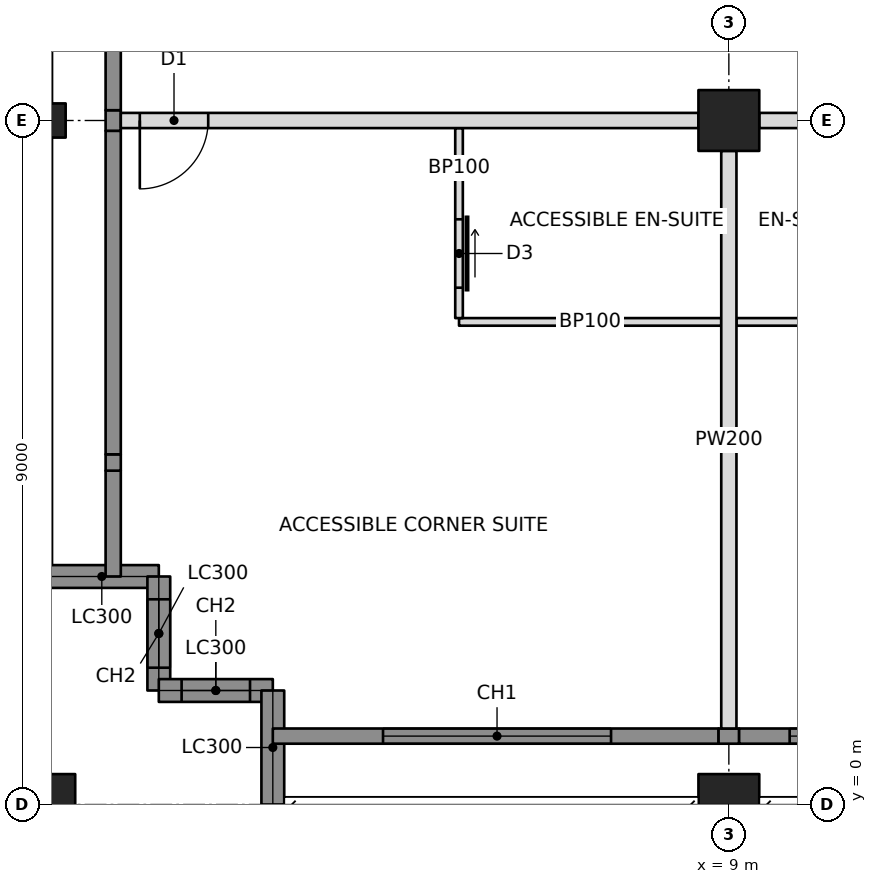
"""IFC4 building model, lengths in metres.
Left out: names, types, materials, properties, quantities, classifications, styles, units other than length and angle.
Written with IfcOpenShell. Run it as: python <this file> out.ifc"""

import sys

from ifc_helpers import new_model, si_unit, direction, frame, frame_2d, origin, origin_with_axes, origin_2d, place, context, subcontext, project, spatial, rectangle, hollow_rectangle, i_section, extrude, element, fill, save


model = new_model("IFC4")
c1 = context("Model", 3, precision=1e-05, world=origin(), true_north=direction((0.0, 1.0)))
c2 = subcontext(c1, "Body", "Model", "MODEL_VIEW")
j1 = project(units=[si_unit("LENGTHUNIT", "METRE"), si_unit("PLANEANGLEUNIT", "RADIAN")], contexts=[c1])
p1 = place(None, origin())
s1 = spatial("IfcSite", under=j1, at=p1, CompositionType="ELEMENT")
p2 = place(p1, origin())
s2 = spatial("IfcBuilding", under=s1, at=p2, CompositionType="ELEMENT")
p3 = place(p2, frame((0.0, 0.0, 187.6)))
s3 = spatial("IfcBuildingStorey", under=s2, at=p3, CompositionType="ELEMENT", Elevation=187.6)
p4 = place(p3, origin_with_axes())
e1 = element("IfcColumn", 1, at=p4, inside=s3, PredefinedType="COLUMN", context=c2, shape_type="SweptSolid", body=[
    extrude(hollow_rectangle(XDim=0.8, YDim=0.8, WallThickness=0.07, at=origin_2d()), origin(), (0.0, 0.0, 1.0), 3.4),
])
p5 = place(p3, frame((0.0, 9.0, 0.0), z_axis=(0.0, 0.0, 1.0), x_axis=(0.0, 1.0, 0.0)))
e2 = element("IfcColumn", 2, at=p5, inside=s3, PredefinedType="COLUMN", context=c2, shape_type="SweptSolid", body=[
    extrude(i_section(OverallWidth=0.449, OverallDepth=0.549, WebThickness=0.072, FlangeThickness=0.115, at=origin_2d()), origin(), (0.0, 0.0, 1.0), 3.4),
])
p6 = place(p3, frame((9.0, 0.0, 0.0), z_axis=(0.0, 0.0, 1.0), x_axis=(1.0, 0.0, 0.0)))
e3 = element("IfcColumn", 3, at=p6, inside=s3, PredefinedType="COLUMN", context=c2, shape_type="SweptSolid", body=[
    extrude(hollow_rectangle(XDim=0.8, YDim=0.8, WallThickness=0.07, at=origin_2d()), origin(), (0.0, 0.0, 1.0), 3.4),
])
p7 = place(p3, frame((9.0, 9.0, 0.0), z_axis=(0.0, 0.0, 1.0), x_axis=(1.0, 0.0, 0.0)))
e4 = element("IfcColumn", 4, at=p7, inside=s3, PredefinedType="COLUMN", context=c2, shape_type="SweptSolid", body=[
    extrude(hollow_rectangle(XDim=0.8, YDim=0.8, WallThickness=0.06, at=origin_2d()), origin(), (0.0, 0.0, 1.0), 3.4),
])
p8 = place(p3, frame((0.0, 3.0, 0.0), z_axis=(0.0, 0.0, 1.0), x_axis=(1.0, 0.0, 0.0)))
e5 = element("IfcWall", 5, at=p8, inside=s3, PredefinedType="SOLIDWALL", context=c2, shape_type="SweptSolid", body=[
    extrude(rectangle(XDim=1.5, YDim=0.3, at=frame_2d((0.75, 0.0))), origin(), (0.0, 0.0, 1.0), 2.42),
])
p9 = place(p3, frame((1.5, 3.0, 0.0), z_axis=(0.0, 0.0, 1.0), x_axis=(0.0, -1.0, 0.0)))
e6 = element("IfcWall", 6, at=p9, inside=s3, PredefinedType="SOLIDWALL", context=c2, shape_type="SweptSolid", body=[
    extrude(rectangle(XDim=1.5, YDim=0.3, at=frame_2d((0.75, 0.0))), origin(), (0.0, 0.0, 1.0), 3.2),
])
p10 = place(p9, frame((0.3, 0.0, 0.6)))
e7 = element("IfcOpeningElement", 7, at=p10, cuts=e6, PredefinedType="OPENING", context=c2, shape_type="SweptSolid", body=[
    extrude(rectangle(XDim=0.9, YDim=2.2, at=frame_2d((0.45, 1.1))), frame((0.0, 0.16, 0.0), z_axis=(0.0, -1.0, 0.0), x_axis=(1.0, 0.0, 0.0)), (0.0, 0.0, 1.0), 0.32),
])
p11 = place(p3, frame((1.5, 1.5, 0.0), z_axis=(0.0, 0.0, 1.0), x_axis=(1.0, 0.0, 0.0)))
e8 = element("IfcWall", 8, at=p11, inside=s3, PredefinedType="SOLIDWALL", context=c2, shape_type="SweptSolid", body=[
    extrude(rectangle(XDim=1.5, YDim=0.3, at=frame_2d((0.75, 0.0))), origin(), (0.0, 0.0, 1.0), 3.2),
])
p12 = place(p11, frame((0.3, 0.0, 0.6)))
e9 = element("IfcOpeningElement", 9, at=p12, cuts=e8, PredefinedType="OPENING", context=c2, shape_type="SweptSolid", body=[
    extrude(rectangle(XDim=0.9, YDim=2.2, at=frame_2d((0.45, 1.1))), frame((0.0, 0.16, 0.0), z_axis=(0.0, -1.0, 0.0), x_axis=(1.0, 0.0, 0.0)), (0.0, 0.0, 1.0), 0.32),
])
p13 = place(p3, frame((3.0, 1.5, 0.0), z_axis=(0.0, 0.0, 1.0), x_axis=(0.0, -1.0, 0.0)))
e10 = element("IfcWall", 10, at=p13, inside=s3, PredefinedType="SOLIDWALL", context=c2, shape_type="SweptSolid", body=[
    extrude(rectangle(XDim=1.5, YDim=0.3, at=frame_2d((0.75, 0.0))), origin(), (0.0, 0.0, 1.0), 2.42),
])
p14 = place(p3, frame((3.0, 0.9, 0.0), z_axis=(0.0, 0.0, 1.0), x_axis=(1.0, 0.0, 0.0)))
e11 = element("IfcWall", 11, at=p14, inside=s3, PredefinedType="SOLIDWALL", context=c2, shape_type="SweptSolid", body=[
    extrude(rectangle(XDim=5.865, YDim=0.2, at=frame_2d((2.932, 0.0))), origin(), (0.0, 0.0, 1.0), 3.2),
])
p15 = place(p14, frame((1.45, 0.0, 0.6)))
e12 = element("IfcOpeningElement", 12, at=p15, cuts=e11, PredefinedType="OPENING", context=c2, shape_type="SweptSolid", body=[
    extrude(rectangle(XDim=3.0, YDim=2.2, at=frame_2d((1.5, 1.1))), frame((0.0, 0.11, 0.0), z_axis=(0.0, -1.0, 0.0), x_axis=(1.0, 0.0, 0.0)), (0.0, 0.0, 1.0), 0.22),
])
p16 = place(p3, frame((0.9, 3.0, 0.0), z_axis=(0.0, 0.0, 1.0), x_axis=(0.0, 1.0, 0.0)))
e13 = element("IfcWall", 13, at=p16, inside=s3, PredefinedType="SOLIDWALL", context=c2, shape_type="SweptSolid", body=[
    extrude(rectangle(XDim=1.393, YDim=0.2, at=frame_2d((0.696, 0.0))), origin(), (0.0, 0.0, 1.0), 3.2),
])
p17 = place(p3, frame((1.0, 9.0, 0.0), z_axis=(0.0, 0.0, 1.0), x_axis=(1.0, 0.0, 0.0)))
e14 = element("IfcWall", 14, at=p17, inside=s3, PredefinedType="PARTITIONING", context=c2, shape_type="SweptSolid", body=[
    extrude(rectangle(XDim=7.6, YDim=0.2, at=frame_2d((3.8, 0.0))), origin(), (0.0, 0.0, 1.0), 2.438),
])
p18 = place(p17, frame((0.25, 0.0, 0.0)))
e15 = element("IfcOpeningElement", 15, at=p18, cuts=e14, PredefinedType="OPENING", context=c2, shape_type="SweptSolid", body=[
    extrude(rectangle(XDim=0.9, YDim=2.1, at=frame_2d((0.45, 1.05))), frame((0.0, 0.11, 0.0), z_axis=(0.0, -1.0, 0.0), x_axis=(1.0, 0.0, 0.0)), (0.0, 0.0, 1.0), 0.22),
])
p19 = place(p3, frame((9.4, 9.0, 0.0), z_axis=(0.0, 0.0, 1.0), x_axis=(1.0, 0.0, 0.0)))
e16 = element("IfcWall", 16, at=p19, inside=s3, PredefinedType="PARTITIONING", context=c2, shape_type="SweptSolid", body=[
    extrude(rectangle(XDim=8.2, YDim=0.2, at=frame_2d((4.1, 0.0))), origin(), (0.0, 0.0, 1.0), 2.405),
])
p20 = place(p19, frame((2.95, 0.0, 0.0)))
e17 = element("IfcOpeningElement", 17, at=p20, cuts=e16, PredefinedType="OPENING", context=c2, shape_type="SweptSolid", body=[
    extrude(rectangle(XDim=0.9, YDim=2.1, at=frame_2d((0.45, 1.05))), frame((0.0, 0.11, 0.0), z_axis=(0.0, -1.0, 0.0), x_axis=(1.0, 0.0, 0.0)), (0.0, 0.0, 1.0), 0.22),
])
p21 = place(p19, frame((4.35, 0.0, 0.0)))
e18 = element("IfcOpeningElement", 18, at=p21, cuts=e16, PredefinedType="OPENING", context=c2, shape_type="SweptSolid", body=[
    extrude(rectangle(XDim=0.9, YDim=2.1, at=frame_2d((0.45, 1.05))), frame((0.0, 0.11, 0.0), z_axis=(0.0, -1.0, 0.0), x_axis=(1.0, 0.0, 0.0)), (0.0, 0.0, 1.0), 0.22),
])
p22 = place(p3, frame((9.0, 8.6, 0.0), z_axis=(0.0, 0.0, 1.0), x_axis=(0.0, -1.0, 0.0)))
e19 = element("IfcWall", 19, at=p22, inside=s3, PredefinedType="PARTITIONING", context=c2, shape_type="SweptSolid", body=[
    extrude(rectangle(XDim=7.6, YDim=0.2, at=frame_2d((3.8, 0.0))), origin(), (0.0, 0.0, 1.0), 2.438),
])
p23 = place(p3, frame((5.45, 6.35, 0.0), z_axis=(0.0, 0.0, 1.0), x_axis=(1.0, 0.0, 0.0)))
e20 = element("IfcWall", 20, at=p23, inside=s3, PredefinedType="PARTITIONING", context=c2, shape_type="SweptSolid", body=[
    extrude(rectangle(XDim=3.45, YDim=0.1, at=frame_2d((1.725, 0.0))), origin(), (0.0, 0.0, 1.0), 2.438),
])
p24 = place(p3, frame((5.45, 8.9, 0.0), z_axis=(0.0, 0.0, 1.0), x_axis=(0.0, -1.0, 0.0)))
e21 = element("IfcWall", 21, at=p24, inside=s3, PredefinedType="PARTITIONING", context=c2, shape_type="SweptSolid", body=[
    extrude(rectangle(XDim=2.5, YDim=0.1, at=frame_2d((1.25, 0.0))), origin(), (0.0, 0.0, 1.0), 2.438),
])
p25 = place(p24, frame((1.2, 0.0, 0.0)))
e22 = element("IfcOpeningElement", 22, at=p25, cuts=e21, PredefinedType="OPENING", context=c2, shape_type="SweptSolid", body=[
    extrude(rectangle(XDim=0.9, YDim=2.1, at=frame_2d((0.45, 1.05))), frame((0.0, 0.06, 0.0), z_axis=(0.0, -1.0, 0.0), x_axis=(1.0, 0.0, 0.0)), (0.0, 0.0, 1.0), 0.12),
])
p26 = place(p3, frame((9.1, 6.35, 0.0), z_axis=(0.0, 0.0, 1.0), x_axis=(1.0, 0.0, 0.0)))
e23 = element("IfcWall", 23, at=p26, inside=s3, PredefinedType="PARTITIONING", context=c2, shape_type="SweptSolid", body=[
    extrude(rectangle(XDim=2.95, YDim=0.1, at=frame_2d((1.475, 0.0))), origin(), (0.0, 0.0, 1.0), 2.438),
])
p27 = place(p3, frame((8.865, 0.9, 0.0), z_axis=(0.0, 0.0, 1.0), x_axis=(1.0, 0.0, 0.0)))
e24 = element("IfcWall", 24, at=p27, inside=s3, PredefinedType="SOLIDWALL", context=c2, shape_type="SweptSolid", body=[
    extrude(rectangle(XDim=0.271, YDim=0.2, at=frame_2d((0.135, 0.0))), origin(), (0.0, 0.0, 1.0), 2.438),
])
p28 = place(p3, frame((9.135, 0.9, 0.0), z_axis=(0.0, 0.0, 1.0), x_axis=(1.0, 0.0, 0.0)))
e25 = element("IfcWall", 25, at=p28, inside=s3, PredefinedType="SOLIDWALL", context=c2, shape_type="SweptSolid", body=[
    extrude(rectangle(XDim=8.671, YDim=0.2, at=frame_2d((4.335, 0.0))), origin(), (0.0, 0.0, 1.0), 3.2),
])
p29 = place(p28, frame((0.665, 0.0, 0.6)))
e26 = element("IfcOpeningElement", 26, at=p29, cuts=e25, PredefinedType="OPENING", context=c2, shape_type="SweptSolid", body=[
    extrude(rectangle(XDim=3.0, YDim=2.2, at=frame_2d((1.5, 1.1))), frame((0.0, 0.11, 0.0), z_axis=(0.0, -1.0, 0.0), x_axis=(1.0, 0.0, 0.0)), (0.0, 0.0, 1.0), 0.22),
])
p30 = place(p28, frame((5.065, 0.0, 0.6)))
e27 = element("IfcOpeningElement", 27, at=p30, cuts=e25, PredefinedType="OPENING", context=c2, shape_type="SweptSolid", body=[
    extrude(rectangle(XDim=3.0, YDim=2.2, at=frame_2d((1.5, 1.1))), frame((0.0, 0.11, 0.0), z_axis=(0.0, -1.0, 0.0), x_axis=(1.0, 0.0, 0.0)), (0.0, 0.0, 1.0), 0.22),
])
p31 = place(p3, frame((0.9, 4.393, 0.0), z_axis=(0.0, 0.0, 1.0), x_axis=(0.0, 1.0, 0.0)))
e28 = element("IfcWall", 28, at=p31, inside=s3, PredefinedType="SOLIDWALL", context=c2, shape_type="SweptSolid", body=[
    extrude(rectangle(XDim=0.215, YDim=0.2, at=frame_2d((0.107, 0.0))), origin(), (0.0, 0.0, 1.0), 2.661),
])
p32 = place(p3, frame((0.9, 4.607, 0.0), z_axis=(0.0, 0.0, 1.0), x_axis=(0.0, 1.0, 0.0)))
e29 = element("IfcWall", 29, at=p32, inside=s3, PredefinedType="SOLIDWALL", context=c2, shape_type="SweptSolid", body=[
    extrude(rectangle(XDim=4.257, YDim=0.2, at=frame_2d((2.129, 0.0))), origin(), (0.0, 0.0, 1.0), 3.2),
])
p33 = place(p3, frame((0.9, 8.865, 0.0), z_axis=(0.0, 0.0, 1.0), x_axis=(0.0, 1.0, 0.0)))
e30 = element("IfcWall", 30, at=p33, inside=s3, PredefinedType="SOLIDWALL", context=c2, shape_type="SweptSolid", body=[
    extrude(rectangle(XDim=0.271, YDim=0.2, at=frame_2d((0.135, 0.0))), origin(), (0.0, 0.0, 1.0), 2.438),
])
p34 = place(p3, frame((0.9, 9.135, 0.0), z_axis=(0.0, 0.0, 1.0), x_axis=(0.0, 1.0, 0.0)))
e31 = element("IfcWall", 31, at=p34, inside=s3, PredefinedType="SOLIDWALL", context=c2, shape_type="SweptSolid", body=[
    extrude(rectangle(XDim=8.671, YDim=0.2, at=frame_2d((4.335, 0.0))), origin(), (0.0, 0.0, 1.0), 3.2),
])
p35 = place(p34, frame((2.015, 0.0, 0.6)))
e32 = element("IfcOpeningElement", 32, at=p35, cuts=e31, PredefinedType="OPENING", context=c2, shape_type="SweptSolid", body=[
    extrude(rectangle(XDim=3.0, YDim=2.2, at=frame_2d((1.5, 1.1))), frame((0.0, 0.11, 0.0), z_axis=(0.0, -1.0, 0.0), x_axis=(1.0, 0.0, 0.0)), (0.0, 0.0, 1.0), 0.22),
])
p36 = place(p34, frame((5.515, 0.0, 0.6)))
e33 = element("IfcOpeningElement", 33, at=p36, cuts=e31, PredefinedType="OPENING", context=c2, shape_type="SweptSolid", body=[
    extrude(rectangle(XDim=3.0, YDim=2.2, at=frame_2d((1.5, 1.1))), frame((0.0, 0.11, 0.0), z_axis=(0.0, -1.0, 0.0), x_axis=(1.0, 0.0, 0.0)), (0.0, 0.0, 1.0), 0.22),
])
p37 = place(p10, origin())
e34 = element("IfcWindow", 34, at=p37, inside=s3, PartitioningType="SINGLE_PANEL", PredefinedType="WINDOW", context=c2, shape_type="SweptSolid", body=[
    extrude(rectangle(XDim=0.9, YDim=2.2, at=frame_2d((0.45, 1.1))), frame((0.0, 0.03, 0.0), z_axis=(0.0, -1.0, 0.0), x_axis=(1.0, 0.0, 0.0)), (0.0, 0.0, 1.0), 0.06),
])
fill(e7, e34)
p38 = place(p12, origin())
e35 = element("IfcWindow", 35, at=p38, inside=s3, PartitioningType="SINGLE_PANEL", PredefinedType="WINDOW", context=c2, shape_type="SweptSolid", body=[
    extrude(rectangle(XDim=0.9, YDim=2.2, at=frame_2d((0.45, 1.1))), frame((0.0, 0.03, 0.0), z_axis=(0.0, -1.0, 0.0), x_axis=(1.0, 0.0, 0.0)), (0.0, 0.0, 1.0), 0.06),
])
fill(e9, e35)
p39 = place(p15, origin())
e36 = element("IfcWindow", 36, at=p39, inside=s3, PartitioningType="TRIPLE_PANEL_VERTICAL", PredefinedType="WINDOW", context=c2, shape_type="SweptSolid", body=[
    extrude(rectangle(XDim=3.0, YDim=2.2, at=frame_2d((1.5, 1.1))), frame((0.0, 0.03, 0.0), z_axis=(0.0, -1.0, 0.0), x_axis=(1.0, 0.0, 0.0)), (0.0, 0.0, 1.0), 0.06),
])
fill(e12, e36)
p40 = place(p29, origin())
e37 = element("IfcWindow", 37, at=p40, inside=s3, PartitioningType="TRIPLE_PANEL_VERTICAL", PredefinedType="WINDOW", context=c2, shape_type="SweptSolid", body=[
    extrude(rectangle(XDim=3.0, YDim=2.2, at=frame_2d((1.5, 1.1))), frame((0.0, 0.03, 0.0), z_axis=(0.0, -1.0, 0.0), x_axis=(1.0, 0.0, 0.0)), (0.0, 0.0, 1.0), 0.06),
])
fill(e26, e37)
p41 = place(p25, origin())
e38 = element("IfcDoor", 38, at=p41, inside=s3, OperationType="SLIDING_TO_LEFT", PredefinedType="DOOR", context=c2, shape_type="SweptSolid", body=[
    extrude(rectangle(XDim=0.9, YDim=2.1, at=frame_2d((0.45, 1.05))), frame((0.0, 0.025, 0.0), z_axis=(0.0, -1.0, 0.0), x_axis=(1.0, 0.0, 0.0)), (0.0, 0.0, 1.0), 0.05),
])
fill(e22, e38)
p42 = place(p18, frame((0.9, 0.0, 0.0), z_axis=(0.0, 0.0, 1.0), x_axis=(-1.0, 0.0, 0.0)))
e39 = element("IfcDoor", 39, at=p42, inside=s3, OperationType="SINGLE_SWING_RIGHT", PredefinedType="DOOR", context=c2, shape_type="SweptSolid", body=[
    extrude(rectangle(XDim=0.9, YDim=2.1, at=frame_2d((0.45, 1.05))), frame((0.0, 0.025, 0.0), z_axis=(0.0, -1.0, 0.0), x_axis=(1.0, 0.0, 0.0)), (0.0, 0.0, 1.0), 0.05),
])
fill(e15, e39)
save(model, sys.argv[1])
